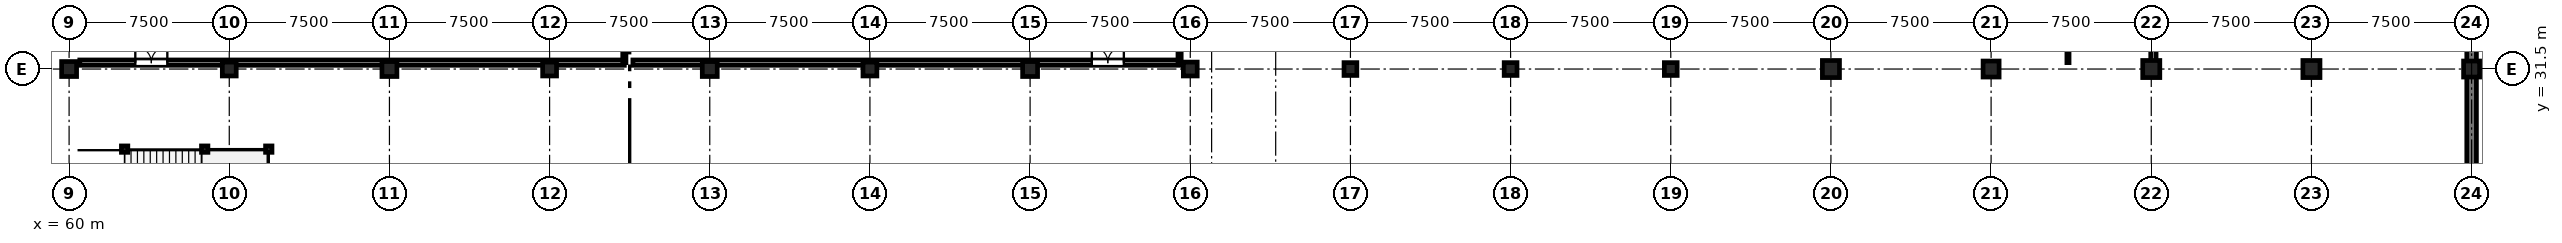
"""IFC4 building model, lengths in metres.
Left out: names, types, materials, properties, quantities, classifications, styles, units other than length and angle.
Written with IfcOpenShell. Run it as: python <this file> out.ifc"""

import sys

from ifc_helpers import new_model, si_unit, direction, frame, frame_2d, origin, origin_2d, place, context, subcontext, project, spatial, rectangle, circle, i_section, extrude, element, fill, save


model = new_model("IFC4")
c1 = context("Model", 3, precision=1e-05, world=origin(), true_north=direction((0.0, 1.0)))
c2 = subcontext(c1, "Body", "Model", "MODEL_VIEW")
j1 = project(units=[si_unit("LENGTHUNIT", "METRE"), si_unit("PLANEANGLEUNIT", "RADIAN")], contexts=[c1])
p1 = place(None, origin())
s1 = spatial("IfcSite", under=j1, at=p1, CompositionType="ELEMENT")
p2 = place(p1, origin())
s2 = spatial("IfcBuilding", under=s1, at=p2, CompositionType="ELEMENT")
p3 = place(p2, frame((0.0, 0.0, -4.5)))
s3 = spatial("IfcBuildingStorey", under=s2, at=p3, CompositionType="ELEMENT", Elevation=-4.5)
p4 = place(p3, frame((60.0, 31.5, 0.0), z_axis=(0.0, 0.0, 1.0), x_axis=(1.0, 0.0, 0.0)))
e1 = element("IfcColumn", 1, at=p4, inside=s3, PredefinedType="COLUMN", context=c2, shape_type="SweptSolid", body=[
    extrude(rectangle(XDim=0.7, YDim=0.7, at=origin_2d()), origin(), (0.0, 0.0, 1.0), 4.5),
])
p5 = place(p3, frame((67.5, 31.5, 0.0), z_axis=(0.0, 0.0, 1.0), x_axis=(1.0, 0.0, 0.0)))
e2 = element("IfcColumn", 2, at=p5, inside=s3, PredefinedType="COLUMN", context=c2, shape_type="SweptSolid", body=[
    extrude(rectangle(XDim=0.65, YDim=0.65, at=origin_2d()), origin(), (0.0, 0.0, 1.0), 4.5),
])
p6 = place(p3, frame((75.0, 31.5, 0.0), z_axis=(0.0, 0.0, 1.0), x_axis=(1.0, 0.0, 0.0)))
e3 = element("IfcColumn", 3, at=p6, inside=s3, PredefinedType="COLUMN", context=c2, shape_type="SweptSolid", body=[
    extrude(rectangle(XDim=0.7, YDim=0.7, at=origin_2d()), origin(), (0.0, 0.0, 1.0), 4.5),
])
p7 = place(p3, frame((82.5, 31.5, 0.0), z_axis=(0.0, 0.0, 1.0), x_axis=(1.0, 0.0, 0.0)))
e4 = element("IfcColumn", 4, at=p7, inside=s3, PredefinedType="COLUMN", context=c2, shape_type="SweptSolid", body=[
    extrude(rectangle(XDim=0.65, YDim=0.65, at=origin_2d()), origin(), (0.0, 0.0, 1.0), 4.5),
])
p8 = place(p3, frame((90.0, 31.5, 0.0), z_axis=(0.0, 0.0, 1.0), x_axis=(1.0, 0.0, 0.0)))
e5 = element("IfcColumn", 5, at=p8, inside=s3, PredefinedType="COLUMN", context=c2, shape_type="SweptSolid", body=[
    extrude(rectangle(XDim=0.7, YDim=0.7, at=origin_2d()), origin(), (0.0, 0.0, 1.0), 4.5),
])
p9 = place(p3, frame((97.5, 31.5, 0.0), z_axis=(0.0, 0.0, 1.0), x_axis=(1.0, 0.0, 0.0)))
e6 = element("IfcColumn", 6, at=p9, inside=s3, PredefinedType="COLUMN", context=c2, shape_type="SweptSolid", body=[
    extrude(rectangle(XDim=0.65, YDim=0.65, at=origin_2d()), origin(), (0.0, 0.0, 1.0), 4.5),
])
p10 = place(p3, frame((105.0, 31.5, 0.0), z_axis=(0.0, 0.0, 1.0), x_axis=(1.0, 0.0, 0.0)))
e7 = element("IfcColumn", 7, at=p10, inside=s3, PredefinedType="COLUMN", context=c2, shape_type="SweptSolid", body=[
    extrude(rectangle(XDim=0.7, YDim=0.7, at=origin_2d()), origin(), (0.0, 0.0, 1.0), 4.5),
])
p11 = place(p3, frame((112.5, 31.5, 0.0), z_axis=(0.0, 0.0, 1.0), x_axis=(1.0, 0.0, 0.0)))
e8 = element("IfcColumn", 8, at=p11, inside=s3, PredefinedType="COLUMN", context=c2, shape_type="SweptSolid", body=[
    extrude(rectangle(XDim=0.65, YDim=0.65, at=origin_2d()), origin(), (0.0, 0.0, 1.0), 4.5),
])
p12 = place(p3, frame((120.0, 31.5, 0.0), z_axis=(0.0, 0.0, 1.0), x_axis=(1.0, 0.0, 0.0)))
e9 = element("IfcColumn", 9, at=p12, inside=s3, PredefinedType="COLUMN", context=c2, shape_type="SweptSolid", body=[
    extrude(rectangle(XDim=0.6, YDim=0.6, at=origin_2d()), origin(), (0.0, 0.0, 1.0), 4.5),
])
p13 = place(p3, frame((127.5, 31.5, 0.0), z_axis=(0.0, 0.0, 1.0), x_axis=(1.0, 0.0, 0.0)))
e10 = element("IfcColumn", 10, at=p13, inside=s3, PredefinedType="COLUMN", context=c2, shape_type="SweptSolid", body=[
    extrude(circle(Radius=0.3, at=origin_2d()), origin(), (0.0, 0.0, 1.0), 4.5),
])
p14 = place(p3, frame((135.0, 31.5, 0.0), z_axis=(0.0, 0.0, 1.0), x_axis=(1.0, 0.0, 0.0)))
e11 = element("IfcColumn", 11, at=p14, inside=s3, PredefinedType="COLUMN", context=c2, shape_type="SweptSolid", body=[
    extrude(rectangle(XDim=0.6, YDim=0.6, at=origin_2d()), origin(), (0.0, 0.0, 1.0), 4.5),
])
p15 = place(p3, frame((142.5, 31.5, 0.0), z_axis=(0.0, 0.0, 1.0), x_axis=(1.0, 0.0, 0.0)))
e12 = element("IfcColumn", 12, at=p15, inside=s3, PredefinedType="COLUMN", context=c2, shape_type="SweptSolid", body=[
    extrude(rectangle(XDim=0.8, YDim=0.8, at=origin_2d()), origin(), (0.0, 0.0, 1.0), 4.5),
])
p16 = place(p3, frame((150.0, 31.5, 0.0), z_axis=(0.0, 0.0, 1.0), x_axis=(1.0, 0.0, 0.0)))
e13 = element("IfcColumn", 13, at=p16, inside=s3, PredefinedType="COLUMN", context=c2, shape_type="SweptSolid", body=[
    extrude(circle(Radius=0.375, at=origin_2d()), origin(), (0.0, 0.0, 1.0), 4.5),
])
for number, where, z_axis, x_axis in (
    (14, (157.5, 31.5, 0.0), (0.0, 0.0, 1.0), (1.0, 0.0, 0.0)),
    (15, (165.0, 31.5, 0.0), (0.0, 0.0, 1.0), (1.0, 0.0, 0.0)),
):
    element("IfcColumn", number, at=place(p3, frame(where, z_axis=z_axis, x_axis=x_axis)), inside=s3, PredefinedType="COLUMN", context=c2, shape_type="SweptSolid", body=[
        extrude(rectangle(XDim=0.8, YDim=0.8, at=origin_2d()), origin(), (0.0, 0.0, 1.0), 4.5),
    ])
p17 = place(p3, frame((172.5, 31.5, 0.0), z_axis=(0.0, 0.0, 1.0), x_axis=(1.0, 0.0, 0.0)))
e16 = element("IfcColumn", 16, at=p17, inside=s3, PredefinedType="COLUMN", context=c2, shape_type="SweptSolid", body=[
    extrude(circle(Radius=0.375, at=origin_2d()), origin(), (0.0, 0.0, 1.0), 4.5),
])
p18 = place(p3, frame((172.5, 39.0, 0.0), z_axis=(0.0, 0.0, 1.0), x_axis=(0.0, -1.0, 0.0)))
e17 = element("IfcWall", 17, at=p18, inside=s3, PredefinedType="SOLIDWALL", context=c2, shape_type="SweptSolid", body=[
    extrude(rectangle(XDim=7.5, YDim=0.45, at=frame_2d((3.75, 0.0))), origin(), (0.0, 0.0, 1.0), 4.14),
])
p19 = place(p3, frame((172.5, 31.5, 0.0), z_axis=(0.0, 0.0, 1.0), x_axis=(0.0, -1.0, 0.0)))
e18 = element("IfcWall", 18, at=p19, inside=s3, PredefinedType="SOLIDWALL", context=c2, shape_type="SweptSolid", body=[
    extrude(rectangle(XDim=9.0, YDim=0.45, at=frame_2d((4.5, 0.0))), origin(), (0.0, 0.0, 1.0), 4.14),
])
for number, where, z_axis, x_axis in (
    (19, (62.6, 27.75, 0.0), (0.0, 0.0, 1.0), (1.0, 0.0, 0.0)),
    (20, (66.35, 27.75, 0.0), (0.0, 0.0, 1.0), (1.0, 0.0, 0.0)),
    (21, (69.35, 27.75, 0.0), (0.0, 0.0, 1.0), (1.0, 0.0, 0.0)),
):
    element("IfcColumn", number, at=place(p3, frame(where, z_axis=z_axis, x_axis=x_axis)), inside=s3, PredefinedType="COLUMN", context=c2, shape_type="SweptSolid", body=[
        extrude(i_section(OverallWidth=0.3, OverallDepth=0.3, WebThickness=0.011, FlangeThickness=0.019, FilletRadius=0.027, at=origin_2d()), origin(), (0.0, 0.0, 1.0), 4.5),
    ])
p20 = place(p3, frame((60.5, 31.8, 0.0), z_axis=(0.0, 0.0, 1.0), x_axis=(1.0, 0.0, 0.0)))
e22 = element("IfcWall", 22, at=p20, inside=s3, PredefinedType="STANDARD", context=c2, shape_type="SweptSolid", body=[
    extrude(rectangle(XDim=25.5, YDim=0.25, at=frame_2d((12.75, 0.0))), origin(), (0.0, 0.0, 1.0), 3.475),
])
p21 = place(p20, frame((2.6, 0.0, 0.0)))
e23 = element("IfcOpeningElement", 23, at=p21, cuts=e22, PredefinedType="OPENING", context=c2, shape_type="SweptSolid", body=[
    extrude(rectangle(XDim=1.5, YDim=2.3, at=frame_2d((0.75, 1.15))), frame((0.0, 0.135, 0.0), z_axis=(0.0, -1.0, 0.0), x_axis=(1.0, 0.0, 0.0)), (0.0, 0.0, 1.0), 0.27),
])
p22 = place(p3, frame((86.4, 31.8, 0.0), z_axis=(0.0, 0.0, 1.0), x_axis=(1.0, 0.0, 0.0)))
e24 = element("IfcWall", 24, at=p22, inside=s3, PredefinedType="STANDARD", context=c2, shape_type="SweptSolid", body=[
    extrude(rectangle(XDim=25.6, YDim=0.25, at=frame_2d((12.8, 0.0))), origin(), (0.0, 0.0, 1.0), 3.475),
])
p23 = place(p22, frame((21.49, 0.0, 0.0)))
e25 = element("IfcOpeningElement", 25, at=p23, cuts=e24, PredefinedType="OPENING", context=c2, shape_type="SweptSolid", body=[
    extrude(rectangle(XDim=1.5, YDim=2.3, at=frame_2d((0.75, 1.15))), frame((0.0, 0.135, 0.0), z_axis=(0.0, -1.0, 0.0), x_axis=(1.0, 0.0, 0.0)), (0.0, 0.0, 1.0), 0.27),
])
p24 = place(p3, frame((153.6, 31.8, 0.0), z_axis=(0.0, 0.0, 1.0), x_axis=(0.0, 1.0, 0.0)))
e26 = element("IfcWall", 26, at=p24, inside=s3, PredefinedType="PARTITIONING", context=c2, shape_type="SweptSolid", body=[
    extrude(rectangle(XDim=44.2, YDim=0.1, at=frame_2d((22.1, 0.0))), origin(), (0.0, 0.0, 1.0), 3.725),
])
p25 = place(p24, frame((25.84, 0.0, 0.0)))
e27 = element("IfcOpeningElement", 27, at=p25, cuts=e26, PredefinedType="OPENING", context=c2, shape_type="SweptSolid", body=[
    extrude(rectangle(XDim=1.05, YDim=2.2, at=frame_2d((0.525, 1.1))), frame((0.0, 0.06, 0.0), z_axis=(0.0, -1.0, 0.0), x_axis=(1.0, 0.0, 0.0)), (0.0, 0.0, 1.0), 0.12),
])
p26 = place(p3, frame((157.6, 38.7, 0.0), z_axis=(0.0, 0.0, 1.0), x_axis=(0.0, -1.0, 0.0)))
e28 = element("IfcWall", 28, at=p26, inside=s3, PredefinedType="STANDARD", context=c2, shape_type="SweptSolid", body=[
    extrude(rectangle(XDim=6.9, YDim=0.25, at=frame_2d((3.45, 0.0))), origin(), (0.0, 0.0, 1.0), 3.525),
])
p27 = place(p26, frame((2.7, 0.0, 0.0)))
e29 = element("IfcOpeningElement", 29, at=p27, cuts=e28, PredefinedType="OPENING", context=c2, shape_type="SweptSolid", body=[
    extrude(rectangle(XDim=1.5, YDim=2.3, at=frame_2d((0.75, 1.15))), frame((0.0, 0.135, 0.0), z_axis=(0.0, -1.0, 0.0), x_axis=(1.0, 0.0, 0.0)), (0.0, 0.0, 1.0), 0.27),
])
p28 = place(p3, frame((86.0, 31.8, 0.0), z_axis=(0.0, 0.0, 1.0), x_axis=(0.0, 1.0, 0.0)))
e30 = element("IfcWall", 30, at=p28, inside=s3, PredefinedType="PARTITIONING", context=c2, shape_type="SweptSolid", body=[
    extrude(rectangle(XDim=21.8, YDim=0.15, at=frame_2d((10.9, 0.0))), origin(), (0.0, 0.0, 1.0), 3.725),
])
p29 = place(p3, frame((112.0, 31.8, 0.0), z_axis=(0.0, 0.0, 1.0), x_axis=(0.0, 1.0, 0.0)))
e31 = element("IfcWall", 31, at=p29, inside=s3, PredefinedType="PARTITIONING", context=c2, shape_type="SweptSolid", body=[
    extrude(rectangle(XDim=21.8, YDim=0.15, at=frame_2d((10.9, 0.0))), origin(), (0.0, 0.0, 1.0), 4.125),
])
p30 = place(p21, origin())
e32 = element("IfcDoor", 32, at=p30, inside=s3, OperationType="DOUBLE_DOOR_SINGLE_SWING", PredefinedType="DOOR", context=c2, shape_type="SweptSolid", body=[
    extrude(rectangle(XDim=1.5, YDim=2.3, at=frame_2d((0.75, 1.15))), frame((0.0, 0.025, 0.0), z_axis=(0.0, -1.0, 0.0), x_axis=(1.0, 0.0, 0.0)), (0.0, 0.0, 1.0), 0.05),
])
fill(e23, e32)
p31 = place(p23, origin())
e33 = element("IfcDoor", 33, at=p31, inside=s3, OperationType="DOUBLE_DOOR_SINGLE_SWING", PredefinedType="DOOR", context=c2, shape_type="SweptSolid", body=[
    extrude(rectangle(XDim=1.5, YDim=2.3, at=frame_2d((0.75, 1.15))), frame((0.0, 0.025, 0.0), z_axis=(0.0, -1.0, 0.0), x_axis=(1.0, 0.0, 0.0)), (0.0, 0.0, 1.0), 0.05),
])
fill(e25, e33)
save(model, sys.argv[1])
